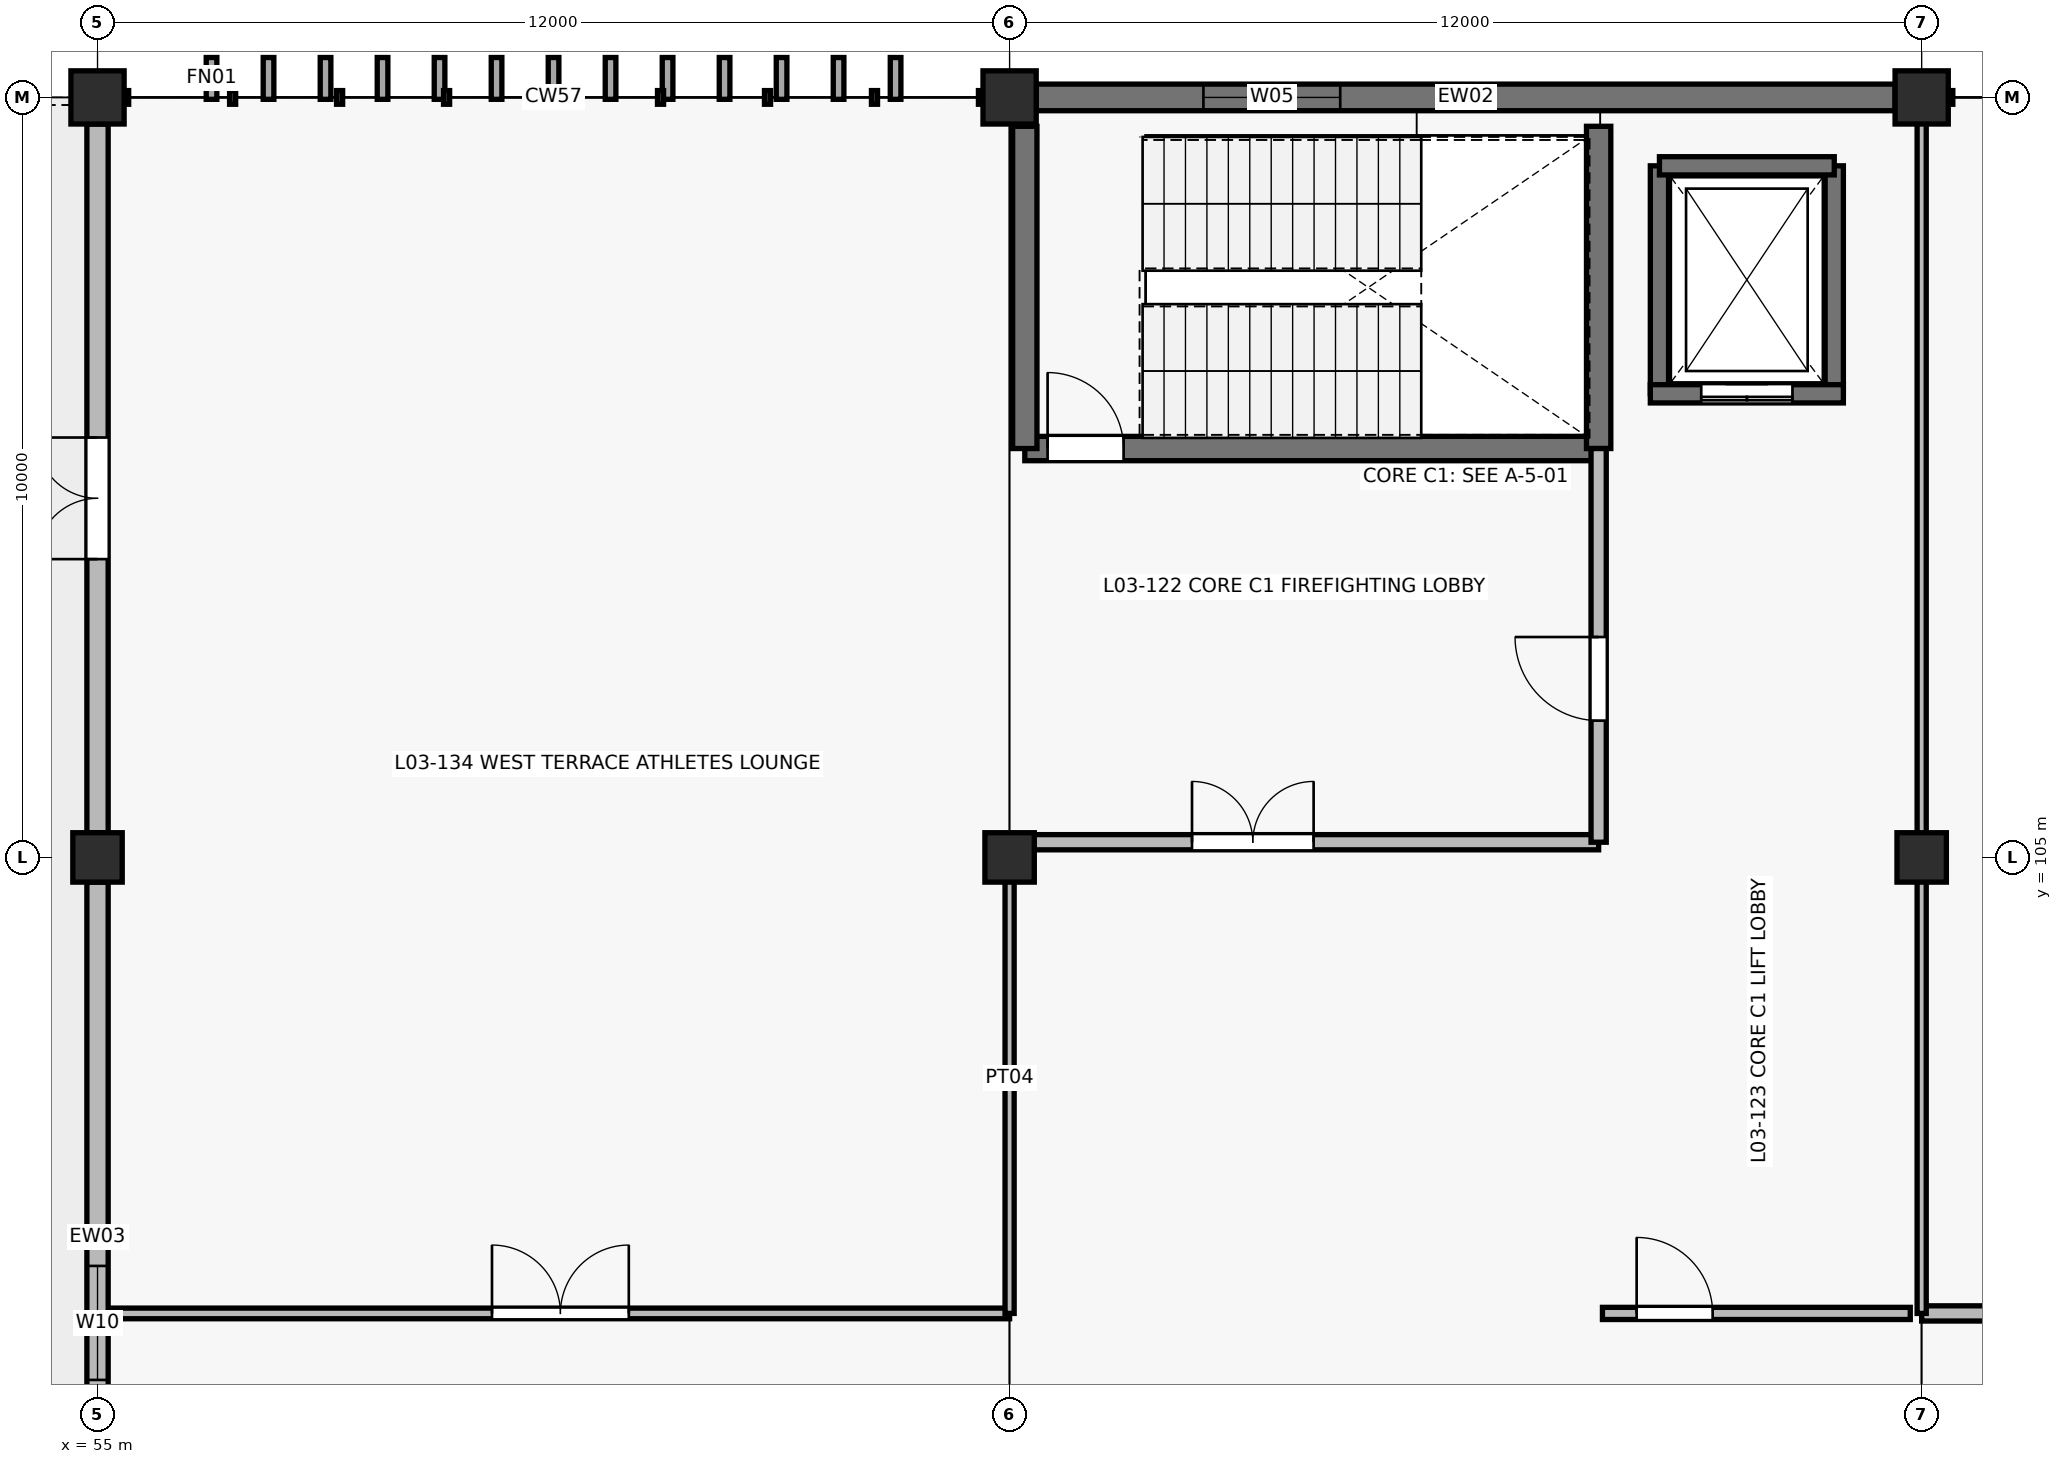
"""IFC4 building model, lengths in metres.
Left out: names, types, materials, properties, quantities, classifications, styles, units other than length and angle.
Written with IfcOpenShell. Run it as: python <this file> out.ifc"""

import sys

from ifc_helpers import new_model, si_unit, direction, frame, frame_2d, origin, origin_2d, place, context, subcontext, project, spatial, rectangle, circle, extrude, element, fill, save


model = new_model("IFC4")
c1 = context("Model", 3, precision=1e-05, world=origin(), true_north=direction((0.0, 1.0)))
c2 = subcontext(c1, "Body", "Model", "MODEL_VIEW")
j1 = project(units=[si_unit("LENGTHUNIT", "METRE"), si_unit("PLANEANGLEUNIT", "RADIAN")], contexts=[c1])
p1 = place(None, origin())
s1 = spatial("IfcSite", under=j1, at=p1, CompositionType="ELEMENT")
p2 = place(p1, origin())
s2 = spatial("IfcBuilding", under=s1, at=p2, CompositionType="ELEMENT")
p3 = place(p2, frame((0.0, 0.0, 13.2)))
s3 = spatial("IfcBuildingStorey", under=s2, at=p3, CompositionType="ELEMENT", Elevation=13.2)
p4 = place(p3, frame((55.0, 105.0, 0.0), z_axis=(0.0, 0.0, 1.0), x_axis=(1.0, 0.0, 0.0)))
e1 = element("IfcColumn", 1, at=p4, inside=s3, PredefinedType="COLUMN", context=c2, shape_type="SweptSolid", body=[
    extrude(rectangle(XDim=0.65, YDim=0.65, at=origin_2d()), origin(), (0.0, 0.0, 1.0), 4.2),
])
p5 = place(p3, frame((55.0, 115.0, 0.0), z_axis=(0.0, 0.0, 1.0), x_axis=(1.0, 0.0, 0.0)))
e2 = element("IfcColumn", 2, at=p5, inside=s3, PredefinedType="COLUMN", context=c2, shape_type="SweptSolid", body=[
    extrude(circle(Radius=0.35, at=origin_2d()), origin(), (0.0, 0.0, 1.0), 4.2),
])
p6 = place(p3, frame((67.0, 105.0, 0.0), z_axis=(0.0, 0.0, 1.0), x_axis=(1.0, 0.0, 0.0)))
e3 = element("IfcColumn", 3, at=p6, inside=s3, PredefinedType="COLUMN", context=c2, shape_type="SweptSolid", body=[
    extrude(rectangle(XDim=0.65, YDim=0.65, at=origin_2d()), origin(), (0.0, 0.0, 1.0), 4.2),
])
p7 = place(p3, frame((67.0, 115.0, 0.0), z_axis=(0.0, 0.0, 1.0), x_axis=(1.0, 0.0, 0.0)))
e4 = element("IfcColumn", 4, at=p7, inside=s3, PredefinedType="COLUMN", context=c2, shape_type="SweptSolid", body=[
    extrude(circle(Radius=0.35, at=origin_2d()), origin(), (0.0, 0.0, 1.0), 4.2),
])
p8 = place(p3, frame((79.0, 105.0, 0.0), z_axis=(0.0, 0.0, 1.0), x_axis=(1.0, 0.0, 0.0)))
e5 = element("IfcColumn", 5, at=p8, inside=s3, PredefinedType="COLUMN", context=c2, shape_type="SweptSolid", body=[
    extrude(rectangle(XDim=0.65, YDim=0.65, at=origin_2d()), origin(), (0.0, 0.0, 1.0), 4.2),
])
p9 = place(p3, frame((79.0, 115.0, 0.0), z_axis=(0.0, 0.0, 1.0), x_axis=(1.0, 0.0, 0.0)))
e6 = element("IfcColumn", 6, at=p9, inside=s3, PredefinedType="COLUMN", context=c2, shape_type="SweptSolid", body=[
    extrude(circle(Radius=0.35, at=origin_2d()), origin(), (0.0, 0.0, 1.0), 4.2),
])
p10 = place(p3, frame((67.35, 115.0, 0.0), z_axis=(0.0, 0.0, 1.0), x_axis=(1.0, 0.0, 0.0)))
e7 = element("IfcWall", 7, at=p10, inside=s3, PredefinedType="SOLIDWALL", context=c2, shape_type="SweptSolid", body=[
    extrude(rectangle(XDim=11.3, YDim=0.35, at=frame_2d((5.65, 0.0))), origin(), (0.0, 0.0, 1.0), 4.2),
])
p11 = place(p10, frame((2.2, 0.0, 1.0)))
e8 = element("IfcOpeningElement", 8, at=p11, cuts=e7, PredefinedType="OPENING", context=c2, shape_type="SweptSolid", body=[
    extrude(rectangle(XDim=1.8, YDim=1.5, at=frame_2d((0.9, 0.75))), frame((0.0, 0.185, 0.0), z_axis=(0.0, -1.0, 0.0), x_axis=(1.0, 0.0, 0.0)), (0.0, 0.0, 1.0), 0.37),
])
p12 = place(p3, frame((55.0, 95.325, 0.0), z_axis=(0.0, 0.0, 1.0), x_axis=(0.0, 1.0, 0.0)))
e9 = element("IfcWall", 9, at=p12, inside=s3, PredefinedType="SOLIDWALL", context=c2, shape_type="SweptSolid", body=[
    extrude(rectangle(XDim=9.35, YDim=0.28, at=frame_2d((4.675, 0.0))), origin(), (0.0, 0.0, 1.0), 3.005),
])
p13 = place(p12, frame((2.8, 0.0, 0.9)))
e10 = element("IfcOpeningElement", 10, at=p13, cuts=e9, PredefinedType="OPENING", context=c2, shape_type="SweptSolid", body=[
    extrude(rectangle(XDim=1.5, YDim=1.8, at=frame_2d((0.75, 0.9))), frame((0.0, 0.15, 0.0), z_axis=(0.0, -1.0, 0.0), x_axis=(1.0, 0.0, 0.0)), (0.0, 0.0, 1.0), 0.3),
])
p14 = place(p3, frame((55.0, 105.325, 0.0), z_axis=(0.0, 0.0, 1.0), x_axis=(0.0, 1.0, 0.0)))
e11 = element("IfcWall", 11, at=p14, inside=s3, PredefinedType="SOLIDWALL", context=c2, shape_type="SweptSolid", body=[
    extrude(rectangle(XDim=9.325, YDim=0.28, at=frame_2d((4.663, 0.0))), origin(), (0.0, 0.0, 1.0), 3.005),
])
p15 = place(p14, frame((3.6, 0.0, 0.0)))
e12 = element("IfcOpeningElement", 12, at=p15, cuts=e11, PredefinedType="OPENING", context=c2, shape_type="SweptSolid", body=[
    extrude(rectangle(XDim=1.6, YDim=2.2, at=frame_2d((0.8, 1.1))), frame((0.0, 0.15, 0.0), z_axis=(0.0, -1.0, 0.0), x_axis=(1.0, 0.0, 0.0)), (0.0, 0.0, 1.0), 0.3),
])
for number, where, z_axis, x_axis in (
    (13, (75.55, 111.1, 0.0), (0.0, 0.0, 1.0), (0.0, 1.0, 0.0)),
    (14, (77.85, 114.1, 0.0), (0.0, 0.0, 1.0), (0.0, -1.0, 0.0)),
):
    element("IfcWall", number, at=place(p3, frame(where, z_axis=z_axis, x_axis=x_axis)), inside=s3, PredefinedType="SHEAR", context=c2, shape_type="SweptSolid", body=[
        extrude(rectangle(XDim=3.0, YDim=0.24, at=frame_2d((1.5, 0.0))), origin(), (0.0, 0.0, 1.0), 4.2),
    ])
p16 = place(p3, frame((75.55, 114.1, 0.0), z_axis=(0.0, 0.0, 1.0), x_axis=(1.0, 0.0, 0.0)))
e15 = element("IfcWall", 15, at=p16, inside=s3, PredefinedType="SHEAR", context=c2, shape_type="SweptSolid", body=[
    extrude(rectangle(XDim=2.3, YDim=0.24, at=frame_2d((1.15, 0.0))), origin(), (0.0, 0.0, 1.0), 4.2),
])
p17 = place(p3, frame((77.97, 111.1, 0.0), z_axis=(0.0, 0.0, 1.0), x_axis=(-1.0, 0.0, 0.0)))
e16 = element("IfcWall", 16, at=p17, inside=s3, PredefinedType="SHEAR", context=c2, shape_type="SweptSolid", body=[
    extrude(rectangle(XDim=2.54, YDim=0.24, at=frame_2d((1.27, 0.0))), origin(), (0.0, 0.0, 1.0), 4.2),
])
p18 = place(p17, frame((0.67, 0.0, 0.0)))
e17 = element("IfcOpeningElement", 17, at=p18, cuts=e16, PredefinedType="OPENING", context=c2, shape_type="SweptSolid", body=[
    extrude(rectangle(XDim=1.2, YDim=2.15, at=frame_2d((0.6, 1.075))), frame((0.0, 0.13, 0.0), z_axis=(0.0, -1.0, 0.0), x_axis=(1.0, 0.0, 0.0)), (0.0, 0.0, 1.0), 0.26),
])
p19 = place(p3, frame((67.2, 110.38, 0.0), z_axis=(0.0, 0.0, 1.0), x_axis=(1.0, 0.0, 0.0)))
e18 = element("IfcWall", 18, at=p19, inside=s3, PredefinedType="SHEAR", context=c2, shape_type="SweptSolid", body=[
    extrude(rectangle(XDim=7.55, YDim=0.32, at=frame_2d((3.775, 0.0))), origin(), (0.0, 0.0, 1.0), 4.2),
])
p20 = place(p19, frame((0.3, 0.0, 0.0)))
e19 = element("IfcOpeningElement", 19, at=p20, cuts=e18, PredefinedType="OPENING", context=c2, shape_type="SweptSolid", body=[
    extrude(rectangle(XDim=1.0, YDim=2.15, at=frame_2d((0.5, 1.075))), frame((0.0, 0.17, 0.0), z_axis=(0.0, -1.0, 0.0), x_axis=(1.0, 0.0, 0.0)), (0.0, 0.0, 1.0), 0.34),
])
for number, where, z_axis, x_axis in (
    (20, (74.75, 110.38, 0.0), (0.0, 0.0, 1.0), (0.0, 1.0, 0.0)),
    (21, (67.2, 114.62, 0.0), (0.0, 0.0, 1.0), (0.0, -1.0, 0.0)),
):
    element("IfcWall", number, at=place(p3, frame(where, z_axis=z_axis, x_axis=x_axis)), inside=s3, PredefinedType="SHEAR", context=c2, shape_type="SweptSolid", body=[
        extrude(rectangle(XDim=4.24, YDim=0.32, at=frame_2d((2.12, 0.0))), origin(), (0.0, 0.0, 1.0), 4.2),
    ])
p21 = place(p3, frame((67.2, 105.2, 0.0), z_axis=(0.0, 0.0, 1.0), x_axis=(1.0, 0.0, 0.0)))
e22 = element("IfcWall", 22, at=p21, inside=s3, PredefinedType="PARTITIONING", context=c2, shape_type="SweptSolid", body=[
    extrude(rectangle(XDim=7.55, YDim=0.2, at=frame_2d((3.775, 0.0))), origin(), (0.0, 0.0, 1.0), 3.005),
])
p22 = place(p21, frame((2.2, 0.0, 0.0)))
e23 = element("IfcOpeningElement", 23, at=p22, cuts=e22, PredefinedType="OPENING", context=c2, shape_type="SweptSolid", body=[
    extrude(rectangle(XDim=1.6, YDim=2.2, at=frame_2d((0.8, 1.1))), frame((0.0, 0.11, 0.0), z_axis=(0.0, -1.0, 0.0), x_axis=(1.0, 0.0, 0.0)), (0.0, 0.0, 1.0), 0.22),
])
p23 = place(p3, frame((74.75, 105.2, 0.0), z_axis=(0.0, 0.0, 1.0), x_axis=(0.0, 1.0, 0.0)))
e24 = element("IfcWall", 24, at=p23, inside=s3, PredefinedType="PARTITIONING", context=c2, shape_type="SweptSolid", body=[
    extrude(rectangle(XDim=5.18, YDim=0.2, at=frame_2d((2.59, 0.0))), origin(), (0.0, 0.0, 1.0), 3.005),
])
p24 = place(p23, frame((1.6, 0.0, 0.0)))
e25 = element("IfcOpeningElement", 25, at=p24, cuts=e24, PredefinedType="OPENING", context=c2, shape_type="SweptSolid", body=[
    extrude(rectangle(XDim=1.1, YDim=2.15, at=frame_2d((0.55, 1.075))), frame((0.0, 0.11, 0.0), z_axis=(0.0, -1.0, 0.0), x_axis=(1.0, 0.0, 0.0)), (0.0, 0.0, 1.0), 0.22),
])
p25 = place(p3, frame((74.8, 99.0, 0.0), z_axis=(0.0, 0.0, 1.0), x_axis=(1.0, 0.0, 0.0)))
e26 = element("IfcWall", 26, at=p25, inside=s3, PredefinedType="PARTITIONING", context=c2, shape_type="SweptSolid", body=[
    extrude(rectangle(XDim=4.05, YDim=0.16, at=frame_2d((2.025, 0.0))), origin(), (0.0, 0.0, 1.0), 3.005),
])
p26 = place(p25, frame((0.45, 0.0, 0.0)))
e27 = element("IfcOpeningElement", 27, at=p26, cuts=e26, PredefinedType="OPENING", context=c2, shape_type="SweptSolid", body=[
    extrude(rectangle(XDim=1.0, YDim=2.15, at=frame_2d((0.5, 1.075))), frame((0.0, 0.09, 0.0), z_axis=(0.0, -1.0, 0.0), x_axis=(1.0, 0.0, 0.0)), (0.0, 0.0, 1.0), 0.18),
])
p27 = place(p3, frame((55.18, 99.0, 0.0), z_axis=(0.0, 0.0, 1.0), x_axis=(1.0, 0.0, 0.0)))
e28 = element("IfcWall", 28, at=p27, inside=s3, PredefinedType="PARTITIONING", context=c2, shape_type="SweptSolid", body=[
    extrude(rectangle(XDim=11.82, YDim=0.14, at=frame_2d((5.91, 0.0))), origin(), (0.0, 0.0, 1.0), 3.005),
])
p28 = place(p27, frame((5.01, 0.0, 0.0)))
e29 = element("IfcOpeningElement", 29, at=p28, cuts=e28, PredefinedType="OPENING", context=c2, shape_type="SweptSolid", body=[
    extrude(rectangle(XDim=1.8, YDim=2.25, at=frame_2d((0.9, 1.125))), frame((0.0, 0.08, 0.0), z_axis=(0.0, -1.0, 0.0), x_axis=(1.0, 0.0, 0.0)), (0.0, 0.0, 1.0), 0.16),
])
p29 = place(p3, frame((67.0, 99.0, 0.0), z_axis=(0.0, 0.0, 1.0), x_axis=(0.0, 1.0, 0.0)))
e30 = element("IfcWall", 30, at=p29, inside=s3, PredefinedType="PARTITIONING", context=c2, shape_type="SweptSolid", body=[
    extrude(rectangle(XDim=6.2, YDim=0.12, at=frame_2d((3.1, 0.0))), origin(), (0.0, 0.0, 1.0), 3.005),
])
p30 = place(p3, frame((79.0, 99.0, 0.0), z_axis=(0.0, 0.0, 1.0), x_axis=(1.0, 0.0, 0.0)))
e31 = element("IfcWall", 31, at=p30, inside=s3, PredefinedType="PARTITIONING", context=c2, shape_type="SweptSolid", body=[
    extrude(rectangle(XDim=12.0, YDim=0.2, at=frame_2d((6.0, 0.0))), origin(), (0.0, 0.0, 1.0), 3.005),
])
p31 = place(p30, frame((5.45, 0.0, 0.0)))
e32 = element("IfcOpeningElement", 32, at=p31, cuts=e31, PredefinedType="OPENING", context=c2, shape_type="SweptSolid", body=[
    extrude(rectangle(XDim=1.1, YDim=2.15, at=frame_2d((0.55, 1.075))), frame((0.0, 0.11, 0.0), z_axis=(0.0, -1.0, 0.0), x_axis=(1.0, 0.0, 0.0)), (0.0, 0.0, 1.0), 0.22),
])
p32 = place(p3, frame((79.0, 99.0, 0.0), z_axis=(0.0, 0.0, 1.0), x_axis=(0.0, 1.0, 0.0)))
e33 = element("IfcWall", 33, at=p32, inside=s3, PredefinedType="PARTITIONING", context=c2, shape_type="SweptSolid", body=[
    extrude(rectangle(XDim=15.75, YDim=0.12, at=frame_2d((7.875, 0.0))), origin(), (0.0, 0.0, 1.0), 3.005),
])
p33 = place(p11, origin())
e34 = element("IfcWindow", 34, at=p33, inside=s3, PartitioningType="DOUBLE_PANEL_VERTICAL", PredefinedType="WINDOW", context=c2, shape_type="SweptSolid", body=[
    extrude(rectangle(XDim=1.8, YDim=1.5, at=frame_2d((0.9, 0.75))), frame((0.0, 0.03, 0.0), z_axis=(0.0, -1.0, 0.0), x_axis=(1.0, 0.0, 0.0)), (0.0, 0.0, 1.0), 0.06),
])
fill(e8, e34)
p34 = place(p13, origin())
e35 = element("IfcWindow", 35, at=p34, inside=s3, PartitioningType="SINGLE_PANEL", PredefinedType="WINDOW", context=c2, shape_type="SweptSolid", body=[
    extrude(rectangle(XDim=1.5, YDim=1.8, at=frame_2d((0.75, 0.9))), frame((0.0, 0.03, 0.0), z_axis=(0.0, -1.0, 0.0), x_axis=(1.0, 0.0, 0.0)), (0.0, 0.0, 1.0), 0.06),
])
fill(e10, e35)
p35 = place(p15, origin())
e36 = element("IfcDoor", 36, at=p35, inside=s3, OperationType="DOUBLE_DOOR_SINGLE_SWING", PredefinedType="DOOR", context=c2, shape_type="SweptSolid", body=[
    extrude(rectangle(XDim=1.6, YDim=2.2, at=frame_2d((0.8, 1.1))), frame((0.0, 0.025, 0.0), z_axis=(0.0, -1.0, 0.0), x_axis=(1.0, 0.0, 0.0)), (0.0, 0.0, 1.0), 0.05),
])
fill(e12, e36)
p36 = place(p18, origin())
e37 = element("IfcDoor", 37, at=p36, inside=s3, OperationType="DOUBLE_DOOR_SLIDING", PredefinedType="USERDEFINED", context=c2, shape_type="SweptSolid", body=[
    extrude(rectangle(XDim=1.2, YDim=2.15, at=frame_2d((0.6, 1.075))), frame((0.0, 0.025, 0.0), z_axis=(0.0, -1.0, 0.0), x_axis=(1.0, 0.0, 0.0)), (0.0, 0.0, 1.0), 0.05),
])
fill(e17, e37)
p37 = place(p20, origin())
e38 = element("IfcDoor", 38, at=p37, inside=s3, OperationType="SINGLE_SWING_LEFT", PredefinedType="DOOR", context=c2, shape_type="SweptSolid", body=[
    extrude(rectangle(XDim=1.0, YDim=2.15, at=frame_2d((0.5, 1.075))), frame((0.0, 0.025, 0.0), z_axis=(0.0, -1.0, 0.0), x_axis=(1.0, 0.0, 0.0)), (0.0, 0.0, 1.0), 0.05),
])
fill(e19, e38)
p38 = place(p22, origin())
e39 = element("IfcDoor", 39, at=p38, inside=s3, OperationType="DOUBLE_DOOR_SINGLE_SWING", PredefinedType="DOOR", context=c2, shape_type="SweptSolid", body=[
    extrude(rectangle(XDim=1.6, YDim=2.2, at=frame_2d((0.8, 1.1))), frame((0.0, 0.025, 0.0), z_axis=(0.0, -1.0, 0.0), x_axis=(1.0, 0.0, 0.0)), (0.0, 0.0, 1.0), 0.05),
])
fill(e23, e39)
p39 = place(p24, origin())
e40 = element("IfcDoor", 40, at=p39, inside=s3, OperationType="SINGLE_SWING_RIGHT", PredefinedType="DOOR", context=c2, shape_type="SweptSolid", body=[
    extrude(rectangle(XDim=1.1, YDim=2.15, at=frame_2d((0.55, 1.075))), frame((0.0, 0.025, 0.0), z_axis=(0.0, -1.0, 0.0), x_axis=(1.0, 0.0, 0.0)), (0.0, 0.0, 1.0), 0.05),
])
fill(e25, e40)
p40 = place(p26, origin())
e41 = element("IfcDoor", 41, at=p40, inside=s3, OperationType="SINGLE_SWING_LEFT", PredefinedType="DOOR", context=c2, shape_type="SweptSolid", body=[
    extrude(rectangle(XDim=1.0, YDim=2.15, at=frame_2d((0.5, 1.075))), frame((0.0, 0.025, 0.0), z_axis=(0.0, -1.0, 0.0), x_axis=(1.0, 0.0, 0.0)), (0.0, 0.0, 1.0), 0.05),
])
fill(e27, e41)
p41 = place(p28, origin())
e42 = element("IfcDoor", 42, at=p41, inside=s3, OperationType="DOUBLE_DOOR_SINGLE_SWING", PredefinedType="DOOR", context=c2, shape_type="SweptSolid", body=[
    extrude(rectangle(XDim=1.8, YDim=2.25, at=frame_2d((0.9, 1.125))), frame((0.0, 0.025, 0.0), z_axis=(0.0, -1.0, 0.0), x_axis=(1.0, 0.0, 0.0)), (0.0, 0.0, 1.0), 0.05),
])
fill(e29, e42)
save(model, sys.argv[1])
